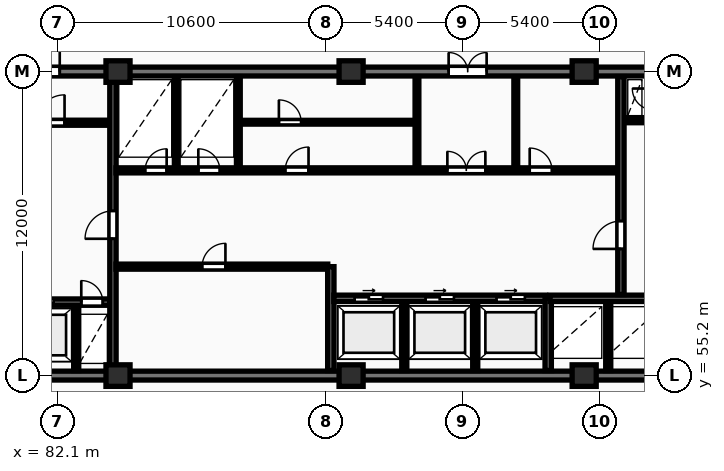
"""IFC4 building model, lengths in metres.
Left out: names, types, materials, properties, quantities, classifications, styles, units other than length and angle.
Written with IfcOpenShell. Run it as: python <this file> out.ifc"""

import sys

from ifc_helpers import new_model, si_unit, direction, frame, frame_2d, origin, origin_2d, place, context, subcontext, project, spatial, rectangle, extrude, element, fill, save


model = new_model("IFC4")
c1 = context("Model", 3, precision=1e-05, world=origin(), true_north=direction((0.0, 1.0)))
c2 = subcontext(c1, "Body", "Model", "MODEL_VIEW")
j1 = project(units=[si_unit("LENGTHUNIT", "METRE"), si_unit("PLANEANGLEUNIT", "RADIAN")], contexts=[c1])
p1 = place(None, origin())
s1 = spatial("IfcSite", under=j1, at=p1, CompositionType="ELEMENT")
p2 = place(p1, origin())
s2 = spatial("IfcBuilding", under=s1, at=p2, CompositionType="ELEMENT")
p3 = place(p2, frame((0.0, 0.0, 113.3)))
s3 = spatial("IfcBuildingStorey", under=s2, at=p3, CompositionType="ELEMENT", Elevation=113.3)
for number, where, z_axis, x_axis in (
    (1, (84.5, 55.2, 0.0), (0.0, 0.0, 1.0), (1.0, 0.0, 0.0)),
    (2, (84.5, 67.2, 0.0), (0.0, 0.0, 1.0), (1.0, 0.0, 0.0)),
    (3, (93.7, 55.2, 0.0), (0.0, 0.0, 1.0), (1.0, 0.0, 0.0)),
    (4, (93.7, 67.2, 0.0), (0.0, 0.0, 1.0), (1.0, 0.0, 0.0)),
    (5, (102.9, 55.2, 0.0), (0.0, 0.0, 1.0), (1.0, 0.0, 0.0)),
    (6, (102.9, 67.2, 0.0), (0.0, 0.0, 1.0), (1.0, 0.0, 0.0)),
):
    element("IfcColumn", number, at=place(p3, frame(where, z_axis=z_axis, x_axis=x_axis)), inside=s3, PredefinedType="COLUMN", context=c2, shape_type="SweptSolid", body=[
        extrude(rectangle(XDim=0.95, YDim=0.85, at=origin_2d()), origin(), (0.0, 0.0, 1.0), 3.25),
    ])
p4 = place(p3, frame((75.95, 55.2, 0.0), z_axis=(0.0, 0.0, 1.0), x_axis=(1.0, 0.0, 0.0)))
e7 = element("IfcWall", 7, at=p4, inside=s3, PredefinedType="SHEAR", context=c2, shape_type="SweptSolid", body=[
    extrude(rectangle(XDim=36.3, YDim=0.35, at=frame_2d((18.15, 0.0))), origin(), (0.0, 0.0, 1.0), 3.25),
])
p5 = place(p3, frame((75.95, 67.2, 0.0), z_axis=(0.0, 0.0, 1.0), x_axis=(1.0, 0.0, 0.0)))
e8 = element("IfcWall", 8, at=p5, inside=s3, PredefinedType="SHEAR", context=c2, shape_type="SweptSolid", body=[
    extrude(rectangle(XDim=36.3, YDim=0.35, at=frame_2d((18.15, 0.0))), origin(), (0.0, 0.0, 1.0), 3.25),
])
p6 = place(p5, frame((5.25, 0.0, 0.0)))
e9 = element("IfcOpeningElement", 9, at=p6, cuts=e8, PredefinedType="OPENING", context=c2, shape_type="SweptSolid", body=[
    extrude(rectangle(XDim=1.0, YDim=2.15, at=frame_2d((0.5, 1.075))), frame((0.0, 0.185, 0.0), z_axis=(0.0, -1.0, 0.0), x_axis=(1.0, 0.0, 0.0)), (0.0, 0.0, 1.0), 0.37),
])
p7 = place(p5, frame((21.6, 0.0, 0.0)))
e10 = element("IfcOpeningElement", 10, at=p7, cuts=e8, PredefinedType="OPENING", context=c2, shape_type="SweptSolid", body=[
    extrude(rectangle(XDim=1.5, YDim=2.2, at=frame_2d((0.75, 1.1))), frame((0.0, 0.185, 0.0), z_axis=(0.0, -1.0, 0.0), x_axis=(1.0, 0.0, 0.0)), (0.0, 0.0, 1.0), 0.37),
])
p8 = place(p5, frame((30.45, 0.0, 0.0)))
e11 = element("IfcOpeningElement", 11, at=p8, cuts=e8, PredefinedType="OPENING", context=c2, shape_type="SweptSolid", body=[
    extrude(rectangle(XDim=1.0, YDim=2.15, at=frame_2d((0.5, 1.075))), frame((0.0, 0.185, 0.0), z_axis=(0.0, -1.0, 0.0), x_axis=(1.0, 0.0, 0.0)), (0.0, 0.0, 1.0), 0.37),
])
p9 = place(p3, frame((79.79, 58.1, 0.0), z_axis=(0.0, 0.0, 1.0), x_axis=(1.0, 0.0, 0.0)))
e12 = element("IfcWall", 12, at=p9, inside=s3, PredefinedType="SHEAR", context=c2, shape_type="SweptSolid", body=[
    extrude(rectangle(XDim=4.39, YDim=0.25, at=frame_2d((2.195, 0.0))), origin(), (0.0, 0.0, 1.0), 3.25),
])
p10 = place(p9, frame((1.05, 0.0, 0.0)))
e13 = element("IfcOpeningElement", 13, at=p10, cuts=e12, PredefinedType="OPENING", context=c2, shape_type="SweptSolid", body=[
    extrude(rectangle(XDim=1.12, YDim=2.12, at=frame_2d((0.56, 1.06))), frame((0.0, 0.135, 0.0), z_axis=(0.0, -1.0, 0.0), x_axis=(1.0, 0.0, 0.0)), (0.0, 0.0, 1.0), 0.27),
])
p11 = place(p9, frame((3.26, 0.0, 0.0)))
e14 = element("IfcOpeningElement", 14, at=p11, cuts=e12, PredefinedType="OPENING", context=c2, shape_type="SweptSolid", body=[
    extrude(rectangle(XDim=0.85, YDim=2.05, at=frame_2d((0.425, 1.025))), frame((0.0, 0.135, 0.0), z_axis=(0.0, -1.0, 0.0), x_axis=(1.0, 0.0, 0.0)), (0.0, 0.0, 1.0), 0.27),
])
p12 = place(p3, frame((82.85, 55.4, 0.0), z_axis=(0.0, 0.0, 1.0), x_axis=(0.0, 1.0, 0.0)))
e15 = element("IfcWall", 15, at=p12, inside=s3, PredefinedType="PARTITIONING", context=c2, shape_type="SweptSolid", body=[
    extrude(rectangle(XDim=2.56, YDim=0.2, at=frame_2d((1.28, 0.0))), origin(), (0.0, 0.0, 1.0), 2.97),
])
p13 = place(p3, frame((79.79, 65.18, 0.0), z_axis=(0.0, 0.0, 1.0), x_axis=(1.0, 0.0, 0.0)))
e16 = element("IfcWall", 16, at=p13, inside=s3, PredefinedType="PARTITIONING", context=c2, shape_type="SweptSolid", body=[
    extrude(rectangle(XDim=4.39, YDim=0.2, at=frame_2d((2.195, 0.0))), origin(), (0.0, 0.0, 1.0), 2.97),
])
p14 = place(p13, frame((1.5, 0.0, 0.0)))
e17 = element("IfcOpeningElement", 17, at=p14, cuts=e16, PredefinedType="OPENING", context=c2, shape_type="SweptSolid", body=[
    extrude(rectangle(XDim=1.1, YDim=2.1, at=frame_2d((0.55, 1.05))), frame((0.0, 0.11, 0.0), z_axis=(0.0, -1.0, 0.0), x_axis=(1.0, 0.0, 0.0)), (0.0, 0.0, 1.0), 0.22),
])
p15 = place(p3, frame((84.3, 55.4, 0.0), z_axis=(0.0, 0.0, 1.0), x_axis=(0.0, 1.0, 0.0)))
e18 = element("IfcWall", 18, at=p15, inside=s3, PredefinedType="SHEAR", context=c2, shape_type="SweptSolid", body=[
    extrude(rectangle(XDim=11.6, YDim=0.25, at=frame_2d((5.8, 0.0))), origin(), (0.0, 0.0, 1.0), 3.25),
])
p16 = place(p15, frame((5.2, 0.0, 0.0)))
e19 = element("IfcOpeningElement", 19, at=p16, cuts=e18, PredefinedType="OPENING", context=c2, shape_type="SweptSolid", body=[
    extrude(rectangle(XDim=1.1, YDim=2.1, at=frame_2d((0.55, 1.05))), frame((0.0, 0.135, 0.0), z_axis=(0.0, -1.0, 0.0), x_axis=(1.0, 0.0, 0.0)), (0.0, 0.0, 1.0), 0.27),
])
p17 = place(p3, frame((84.42, 59.5, 0.0), z_axis=(0.0, 0.0, 1.0), x_axis=(1.0, 0.0, 0.0)))
e20 = element("IfcWall", 20, at=p17, inside=s3, PredefinedType="PARTITIONING", context=c2, shape_type="SweptSolid", body=[
    extrude(rectangle(XDim=8.36, YDim=0.2, at=frame_2d((4.18, 0.0))), origin(), (0.0, 0.0, 1.0), 2.97),
])
p18 = place(p17, frame((3.4, 0.0, 0.0)))
e21 = element("IfcOpeningElement", 21, at=p18, cuts=e20, PredefinedType="OPENING", context=c2, shape_type="SweptSolid", body=[
    extrude(rectangle(XDim=0.92, YDim=2.08, at=frame_2d((0.46, 1.04))), frame((0.0, 0.11, 0.0), z_axis=(0.0, -1.0, 0.0), x_axis=(1.0, 0.0, 0.0)), (0.0, 0.0, 1.0), 0.22),
])
p19 = place(p3, frame((92.9, 55.4, 0.0), z_axis=(0.0, 0.0, 1.0), x_axis=(0.0, 1.0, 0.0)))
e22 = element("IfcWall", 22, at=p19, inside=s3, PredefinedType="SHEAR", context=c2, shape_type="SweptSolid", body=[
    extrude(rectangle(XDim=4.1, YDim=0.25, at=frame_2d((2.05, 0.0))), origin(), (0.0, 0.0, 1.0), 3.25),
])
for number, where, z_axis, x_axis in (
    (23, (95.8, 55.4, 0.0), (0.0, 0.0, 1.0), (0.0, 1.0, 0.0)),
    (24, (98.6, 55.4, 0.0), (0.0, 0.0, 1.0), (0.0, 1.0, 0.0)),
):
    element("IfcWall", number, at=place(p3, frame(where, z_axis=z_axis, x_axis=x_axis)), inside=s3, PredefinedType="PARTITIONING", context=c2, shape_type="SweptSolid", body=[
        extrude(rectangle(XDim=2.72, YDim=0.2, at=frame_2d((1.36, 0.0))), origin(), (0.0, 0.0, 1.0), 2.97),
    ])
p20 = place(p3, frame((93.02, 58.25, 0.0), z_axis=(0.0, 0.0, 1.0), x_axis=(1.0, 0.0, 0.0)))
e25 = element("IfcWall", 25, at=p20, inside=s3, PredefinedType="SHEAR", context=c2, shape_type="SweptSolid", body=[
    extrude(rectangle(XDim=8.36, YDim=0.25, at=frame_2d((4.18, 0.0))), origin(), (0.0, 0.0, 1.0), 3.25),
])
p21 = place(p20, frame((0.82, 0.0, 0.0)))
e26 = element("IfcOpeningElement", 26, at=p21, cuts=e25, PredefinedType="OPENING", context=c2, shape_type="SweptSolid", body=[
    extrude(rectangle(XDim=1.12, YDim=2.12, at=frame_2d((0.56, 1.06))), frame((0.0, 0.135, 0.0), z_axis=(0.0, -1.0, 0.0), x_axis=(1.0, 0.0, 0.0)), (0.0, 0.0, 1.0), 0.27),
])
p22 = place(p20, frame((3.62, 0.0, 0.0)))
e27 = element("IfcOpeningElement", 27, at=p22, cuts=e25, PredefinedType="OPENING", context=c2, shape_type="SweptSolid", body=[
    extrude(rectangle(XDim=1.12, YDim=2.12, at=frame_2d((0.56, 1.06))), frame((0.0, 0.135, 0.0), z_axis=(0.0, -1.0, 0.0), x_axis=(1.0, 0.0, 0.0)), (0.0, 0.0, 1.0), 0.27),
])
p23 = place(p20, frame((6.42, 0.0, 0.0)))
e28 = element("IfcOpeningElement", 28, at=p23, cuts=e25, PredefinedType="OPENING", context=c2, shape_type="SweptSolid", body=[
    extrude(rectangle(XDim=1.12, YDim=2.12, at=frame_2d((0.56, 1.06))), frame((0.0, 0.135, 0.0), z_axis=(0.0, -1.0, 0.0), x_axis=(1.0, 0.0, 0.0)), (0.0, 0.0, 1.0), 0.27),
])
p24 = place(p3, frame((101.48, 55.4, 0.0), z_axis=(0.0, 0.0, 1.0), x_axis=(0.0, 1.0, 0.0)))
e29 = element("IfcWall", 29, at=p24, inside=s3, PredefinedType="SHEAR", context=c2, shape_type="SweptSolid", body=[
    extrude(rectangle(XDim=2.85, YDim=0.25, at=frame_2d((1.425, 0.0))), origin(), (0.0, 0.0, 1.0), 3.25),
])
p25 = place(p3, frame((103.85, 55.4, 0.0), z_axis=(0.0, 0.0, 1.0), x_axis=(0.0, 1.0, 0.0)))
e30 = element("IfcWall", 30, at=p25, inside=s3, PredefinedType="PARTITIONING", context=c2, shape_type="SweptSolid", body=[
    extrude(rectangle(XDim=2.72, YDim=0.2, at=frame_2d((1.36, 0.0))), origin(), (0.0, 0.0, 1.0), 2.97),
])
p26 = place(p3, frame((101.55, 58.25, 0.0), z_axis=(0.0, 0.0, 1.0), x_axis=(1.0, 0.0, 0.0)))
e31 = element("IfcWall", 31, at=p26, inside=s3, PredefinedType="SHEAR", context=c2, shape_type="SweptSolid", body=[
    extrude(rectangle(XDim=4.6, YDim=0.25, at=frame_2d((2.3, 0.0))), origin(), (0.0, 0.0, 1.0), 3.25),
])
for number, where, z_axis, x_axis in (
    (32, (86.8, 63.4, 0.0), (0.0, 0.0, 1.0), (0.0, 1.0, 0.0)),
    (33, (89.25, 63.4, 0.0), (0.0, 0.0, 1.0), (0.0, 1.0, 0.0)),
):
    element("IfcWall", number, at=place(p3, frame(where, z_axis=z_axis, x_axis=x_axis)), inside=s3, PredefinedType="PARTITIONING", context=c2, shape_type="SweptSolid", body=[
        extrude(rectangle(XDim=3.6, YDim=0.15, at=frame_2d((1.8, 0.0))), origin(), (0.0, 0.0, 1.0), 2.97),
    ])
p27 = place(p3, frame((89.25, 65.2, 0.0), z_axis=(0.0, 0.0, 1.0), x_axis=(1.0, 0.0, 0.0)))
e34 = element("IfcWall", 34, at=p27, inside=s3, PredefinedType="PARTITIONING", context=c2, shape_type="SweptSolid", body=[
    extrude(rectangle(XDim=7.05, YDim=0.15, at=frame_2d((3.525, 0.0))), origin(), (0.0, 0.0, 1.0), 2.97),
])
p28 = place(p27, frame((1.6, 0.0, 0.0)))
e35 = element("IfcOpeningElement", 35, at=p28, cuts=e34, PredefinedType="OPENING", context=c2, shape_type="SweptSolid", body=[
    extrude(rectangle(XDim=0.88, YDim=2.06, at=frame_2d((0.44, 1.03))), frame((0.0, 0.085, 0.0), z_axis=(0.0, -1.0, 0.0), x_axis=(1.0, 0.0, 0.0)), (0.0, 0.0, 1.0), 0.17),
])
for number, where, z_axis, x_axis in (
    (36, (96.3, 63.4, 0.0), (0.0, 0.0, 1.0), (0.0, 1.0, 0.0)),
    (37, (100.2, 63.4, 0.0), (0.0, 0.0, 1.0), (0.0, 1.0, 0.0)),
):
    element("IfcWall", number, at=place(p3, frame(where, z_axis=z_axis, x_axis=x_axis)), inside=s3, PredefinedType="PARTITIONING", context=c2, shape_type="SweptSolid", body=[
        extrude(rectangle(XDim=3.6, YDim=0.15, at=frame_2d((1.8, 0.0))), origin(), (0.0, 0.0, 1.0), 2.97),
    ])
p29 = place(p3, frame((84.42, 63.3, 0.0), z_axis=(0.0, 0.0, 1.0), x_axis=(1.0, 0.0, 0.0)))
e38 = element("IfcWall", 38, at=p29, inside=s3, PredefinedType="PARTITIONING", context=c2, shape_type="SweptSolid", body=[
    extrude(rectangle(XDim=19.83, YDim=0.2, at=frame_2d((9.915, 0.0))), origin(), (0.0, 0.0, 1.0), 2.97),
])
p30 = place(p29, frame((1.15, 0.0, 0.0)))
e39 = element("IfcOpeningElement", 39, at=p30, cuts=e38, PredefinedType="OPENING", context=c2, shape_type="SweptSolid", body=[
    extrude(rectangle(XDim=0.85, YDim=2.05, at=frame_2d((0.425, 1.025))), frame((0.0, 0.11, 0.0), z_axis=(0.0, -1.0, 0.0), x_axis=(1.0, 0.0, 0.0)), (0.0, 0.0, 1.0), 0.22),
])
p31 = place(p29, frame((3.25, 0.0, 0.0)))
e40 = element("IfcOpeningElement", 40, at=p31, cuts=e38, PredefinedType="OPENING", context=c2, shape_type="SweptSolid", body=[
    extrude(rectangle(XDim=0.85, YDim=2.05, at=frame_2d((0.425, 1.025))), frame((0.0, 0.11, 0.0), z_axis=(0.0, -1.0, 0.0), x_axis=(1.0, 0.0, 0.0)), (0.0, 0.0, 1.0), 0.22),
])
p32 = place(p29, frame((13.08, 0.0, 0.0)))
e41 = element("IfcOpeningElement", 41, at=p32, cuts=e38, PredefinedType="OPENING", context=c2, shape_type="SweptSolid", body=[
    extrude(rectangle(XDim=1.5, YDim=2.2, at=frame_2d((0.75, 1.1))), frame((0.0, 0.11, 0.0), z_axis=(0.0, -1.0, 0.0), x_axis=(1.0, 0.0, 0.0)), (0.0, 0.0, 1.0), 0.22),
])
p33 = place(p29, frame((6.68, 0.0, 0.0)))
e42 = element("IfcOpeningElement", 42, at=p33, cuts=e38, PredefinedType="OPENING", context=c2, shape_type="SweptSolid", body=[
    extrude(rectangle(XDim=0.92, YDim=2.08, at=frame_2d((0.46, 1.04))), frame((0.0, 0.11, 0.0), z_axis=(0.0, -1.0, 0.0), x_axis=(1.0, 0.0, 0.0)), (0.0, 0.0, 1.0), 0.22),
])
p34 = place(p29, frame((16.33, 0.0, 0.0)))
e43 = element("IfcOpeningElement", 43, at=p34, cuts=e38, PredefinedType="OPENING", context=c2, shape_type="SweptSolid", body=[
    extrude(rectangle(XDim=0.88, YDim=2.06, at=frame_2d((0.44, 1.03))), frame((0.0, 0.11, 0.0), z_axis=(0.0, -1.0, 0.0), x_axis=(1.0, 0.0, 0.0)), (0.0, 0.0, 1.0), 0.22),
])
p35 = place(p3, frame((104.45, 65.28, 0.0), z_axis=(0.0, 0.0, 1.0), x_axis=(1.0, 0.0, 0.0)))
e44 = element("IfcWall", 44, at=p35, inside=s3, PredefinedType="PARTITIONING", context=c2, shape_type="SweptSolid", body=[
    extrude(rectangle(XDim=1.2, YDim=0.2, at=frame_2d((0.6, 0.0))), origin(), (0.0, 0.0, 1.0), 2.97),
])
p36 = place(p3, frame((104.35, 58.4, 0.0), z_axis=(0.0, 0.0, 1.0), x_axis=(0.0, 1.0, 0.0)))
e45 = element("IfcWall", 45, at=p36, inside=s3, PredefinedType="SHEAR", context=c2, shape_type="SweptSolid", body=[
    extrude(rectangle(XDim=8.6, YDim=0.25, at=frame_2d((4.3, 0.0))), origin(), (0.0, 0.0, 1.0), 3.25),
])
p37 = place(p36, frame((1.8, 0.0, 0.0)))
e46 = element("IfcOpeningElement", 46, at=p37, cuts=e45, PredefinedType="OPENING", context=c2, shape_type="SweptSolid", body=[
    extrude(rectangle(XDim=1.1, YDim=2.1, at=frame_2d((0.55, 1.05))), frame((0.0, 0.135, 0.0), z_axis=(0.0, -1.0, 0.0), x_axis=(1.0, 0.0, 0.0)), (0.0, 0.0, 1.0), 0.27),
])
p38 = place(p6, origin())
e47 = element("IfcDoor", 47, at=p38, inside=s3, OperationType="SINGLE_SWING_RIGHT", PredefinedType="DOOR", context=c2, shape_type="SweptSolid", body=[
    extrude(rectangle(XDim=1.0, YDim=2.15, at=frame_2d((0.5, 1.075))), frame((0.0, 0.025, 0.0), z_axis=(0.0, -1.0, 0.0), x_axis=(1.0, 0.0, 0.0)), (0.0, 0.0, 1.0), 0.05),
])
fill(e9, e47)
p39 = place(p7, origin())
e48 = element("IfcDoor", 48, at=p39, inside=s3, OperationType="DOUBLE_DOOR_SINGLE_SWING", PredefinedType="DOOR", context=c2, shape_type="SweptSolid", body=[
    extrude(rectangle(XDim=1.5, YDim=2.2, at=frame_2d((0.75, 1.1))), frame((0.0, 0.025, 0.0), z_axis=(0.0, -1.0, 0.0), x_axis=(1.0, 0.0, 0.0)), (0.0, 0.0, 1.0), 0.05),
])
fill(e10, e48)
p40 = place(p10, origin())
e49 = element("IfcDoor", 49, at=p40, inside=s3, OperationType="SLIDING_TO_LEFT", PredefinedType="DOOR", context=c2, shape_type="SweptSolid", body=[
    extrude(rectangle(XDim=1.12, YDim=2.12, at=frame_2d((0.56, 1.06))), frame((0.0, 0.025, 0.0), z_axis=(0.0, -1.0, 0.0), x_axis=(1.0, 0.0, 0.0)), (0.0, 0.0, 1.0), 0.05),
])
fill(e13, e49)
p41 = place(p11, origin())
e50 = element("IfcDoor", 50, at=p41, inside=s3, OperationType="SINGLE_SWING_LEFT", PredefinedType="DOOR", context=c2, shape_type="SweptSolid", body=[
    extrude(rectangle(XDim=0.85, YDim=2.05, at=frame_2d((0.425, 1.025))), frame((0.0, 0.025, 0.0), z_axis=(0.0, -1.0, 0.0), x_axis=(1.0, 0.0, 0.0)), (0.0, 0.0, 1.0), 0.05),
])
fill(e14, e50)
p42 = place(p14, origin())
e51 = element("IfcDoor", 51, at=p42, inside=s3, OperationType="SINGLE_SWING_RIGHT", PredefinedType="DOOR", context=c2, shape_type="SweptSolid", body=[
    extrude(rectangle(XDim=1.1, YDim=2.1, at=frame_2d((0.55, 1.05))), frame((0.0, 0.025, 0.0), z_axis=(0.0, -1.0, 0.0), x_axis=(1.0, 0.0, 0.0)), (0.0, 0.0, 1.0), 0.05),
])
fill(e17, e51)
p43 = place(p16, origin())
e52 = element("IfcDoor", 52, at=p43, inside=s3, OperationType="SINGLE_SWING_LEFT", PredefinedType="DOOR", context=c2, shape_type="SweptSolid", body=[
    extrude(rectangle(XDim=1.1, YDim=2.1, at=frame_2d((0.55, 1.05))), frame((0.0, 0.025, 0.0), z_axis=(0.0, -1.0, 0.0), x_axis=(1.0, 0.0, 0.0)), (0.0, 0.0, 1.0), 0.05),
])
fill(e19, e52)
p44 = place(p18, origin())
e53 = element("IfcDoor", 53, at=p44, inside=s3, OperationType="SINGLE_SWING_RIGHT", PredefinedType="DOOR", context=c2, shape_type="SweptSolid", body=[
    extrude(rectangle(XDim=0.92, YDim=2.08, at=frame_2d((0.46, 1.04))), frame((0.0, 0.025, 0.0), z_axis=(0.0, -1.0, 0.0), x_axis=(1.0, 0.0, 0.0)), (0.0, 0.0, 1.0), 0.05),
])
fill(e21, e53)
p45 = place(p21, origin())
e54 = element("IfcDoor", 54, at=p45, inside=s3, OperationType="SLIDING_TO_RIGHT", PredefinedType="DOOR", context=c2, shape_type="SweptSolid", body=[
    extrude(rectangle(XDim=1.12, YDim=2.12, at=frame_2d((0.56, 1.06))), frame((0.0, 0.025, 0.0), z_axis=(0.0, -1.0, 0.0), x_axis=(1.0, 0.0, 0.0)), (0.0, 0.0, 1.0), 0.05),
])
fill(e26, e54)
p46 = place(p22, origin())
e55 = element("IfcDoor", 55, at=p46, inside=s3, OperationType="SLIDING_TO_RIGHT", PredefinedType="DOOR", context=c2, shape_type="SweptSolid", body=[
    extrude(rectangle(XDim=1.12, YDim=2.12, at=frame_2d((0.56, 1.06))), frame((0.0, 0.025, 0.0), z_axis=(0.0, -1.0, 0.0), x_axis=(1.0, 0.0, 0.0)), (0.0, 0.0, 1.0), 0.05),
])
fill(e27, e55)
p47 = place(p23, origin())
e56 = element("IfcDoor", 56, at=p47, inside=s3, OperationType="SLIDING_TO_RIGHT", PredefinedType="DOOR", context=c2, shape_type="SweptSolid", body=[
    extrude(rectangle(XDim=1.12, YDim=2.12, at=frame_2d((0.56, 1.06))), frame((0.0, 0.025, 0.0), z_axis=(0.0, -1.0, 0.0), x_axis=(1.0, 0.0, 0.0)), (0.0, 0.0, 1.0), 0.05),
])
fill(e28, e56)
p48 = place(p28, origin())
e57 = element("IfcDoor", 57, at=p48, inside=s3, OperationType="SINGLE_SWING_LEFT", PredefinedType="DOOR", context=c2, shape_type="SweptSolid", body=[
    extrude(rectangle(XDim=0.88, YDim=2.06, at=frame_2d((0.44, 1.03))), frame((0.0, 0.025, 0.0), z_axis=(0.0, -1.0, 0.0), x_axis=(1.0, 0.0, 0.0)), (0.0, 0.0, 1.0), 0.05),
])
fill(e35, e57)
p49 = place(p30, origin())
e58 = element("IfcDoor", 58, at=p49, inside=s3, OperationType="SINGLE_SWING_RIGHT", PredefinedType="DOOR", context=c2, shape_type="SweptSolid", body=[
    extrude(rectangle(XDim=0.85, YDim=2.05, at=frame_2d((0.425, 1.025))), frame((0.0, 0.025, 0.0), z_axis=(0.0, -1.0, 0.0), x_axis=(1.0, 0.0, 0.0)), (0.0, 0.0, 1.0), 0.05),
])
fill(e39, e58)
p50 = place(p31, origin())
e59 = element("IfcDoor", 59, at=p50, inside=s3, OperationType="SINGLE_SWING_LEFT", PredefinedType="DOOR", context=c2, shape_type="SweptSolid", body=[
    extrude(rectangle(XDim=0.85, YDim=2.05, at=frame_2d((0.425, 1.025))), frame((0.0, 0.025, 0.0), z_axis=(0.0, -1.0, 0.0), x_axis=(1.0, 0.0, 0.0)), (0.0, 0.0, 1.0), 0.05),
])
fill(e40, e59)
p51 = place(p32, origin())
e60 = element("IfcDoor", 60, at=p51, inside=s3, OperationType="DOUBLE_DOOR_SINGLE_SWING", PredefinedType="DOOR", context=c2, shape_type="SweptSolid", body=[
    extrude(rectangle(XDim=1.5, YDim=2.2, at=frame_2d((0.75, 1.1))), frame((0.0, 0.025, 0.0), z_axis=(0.0, -1.0, 0.0), x_axis=(1.0, 0.0, 0.0)), (0.0, 0.0, 1.0), 0.05),
])
fill(e41, e60)
p52 = place(p33, origin())
e61 = element("IfcDoor", 61, at=p52, inside=s3, OperationType="SINGLE_SWING_RIGHT", PredefinedType="DOOR", context=c2, shape_type="SweptSolid", body=[
    extrude(rectangle(XDim=0.92, YDim=2.08, at=frame_2d((0.46, 1.04))), frame((0.0, 0.025, 0.0), z_axis=(0.0, -1.0, 0.0), x_axis=(1.0, 0.0, 0.0)), (0.0, 0.0, 1.0), 0.05),
])
fill(e42, e61)
p53 = place(p34, origin())
e62 = element("IfcDoor", 62, at=p53, inside=s3, OperationType="SINGLE_SWING_LEFT", PredefinedType="DOOR", context=c2, shape_type="SweptSolid", body=[
    extrude(rectangle(XDim=0.88, YDim=2.06, at=frame_2d((0.44, 1.03))), frame((0.0, 0.025, 0.0), z_axis=(0.0, -1.0, 0.0), x_axis=(1.0, 0.0, 0.0)), (0.0, 0.0, 1.0), 0.05),
])
fill(e43, e62)
p54 = place(p37, origin())
e63 = element("IfcDoor", 63, at=p54, inside=s3, OperationType="SINGLE_SWING_LEFT", PredefinedType="DOOR", context=c2, shape_type="SweptSolid", body=[
    extrude(rectangle(XDim=1.1, YDim=2.1, at=frame_2d((0.55, 1.05))), frame((0.0, 0.025, 0.0), z_axis=(0.0, -1.0, 0.0), x_axis=(1.0, 0.0, 0.0)), (0.0, 0.0, 1.0), 0.05),
])
fill(e46, e63)
save(model, sys.argv[1])
